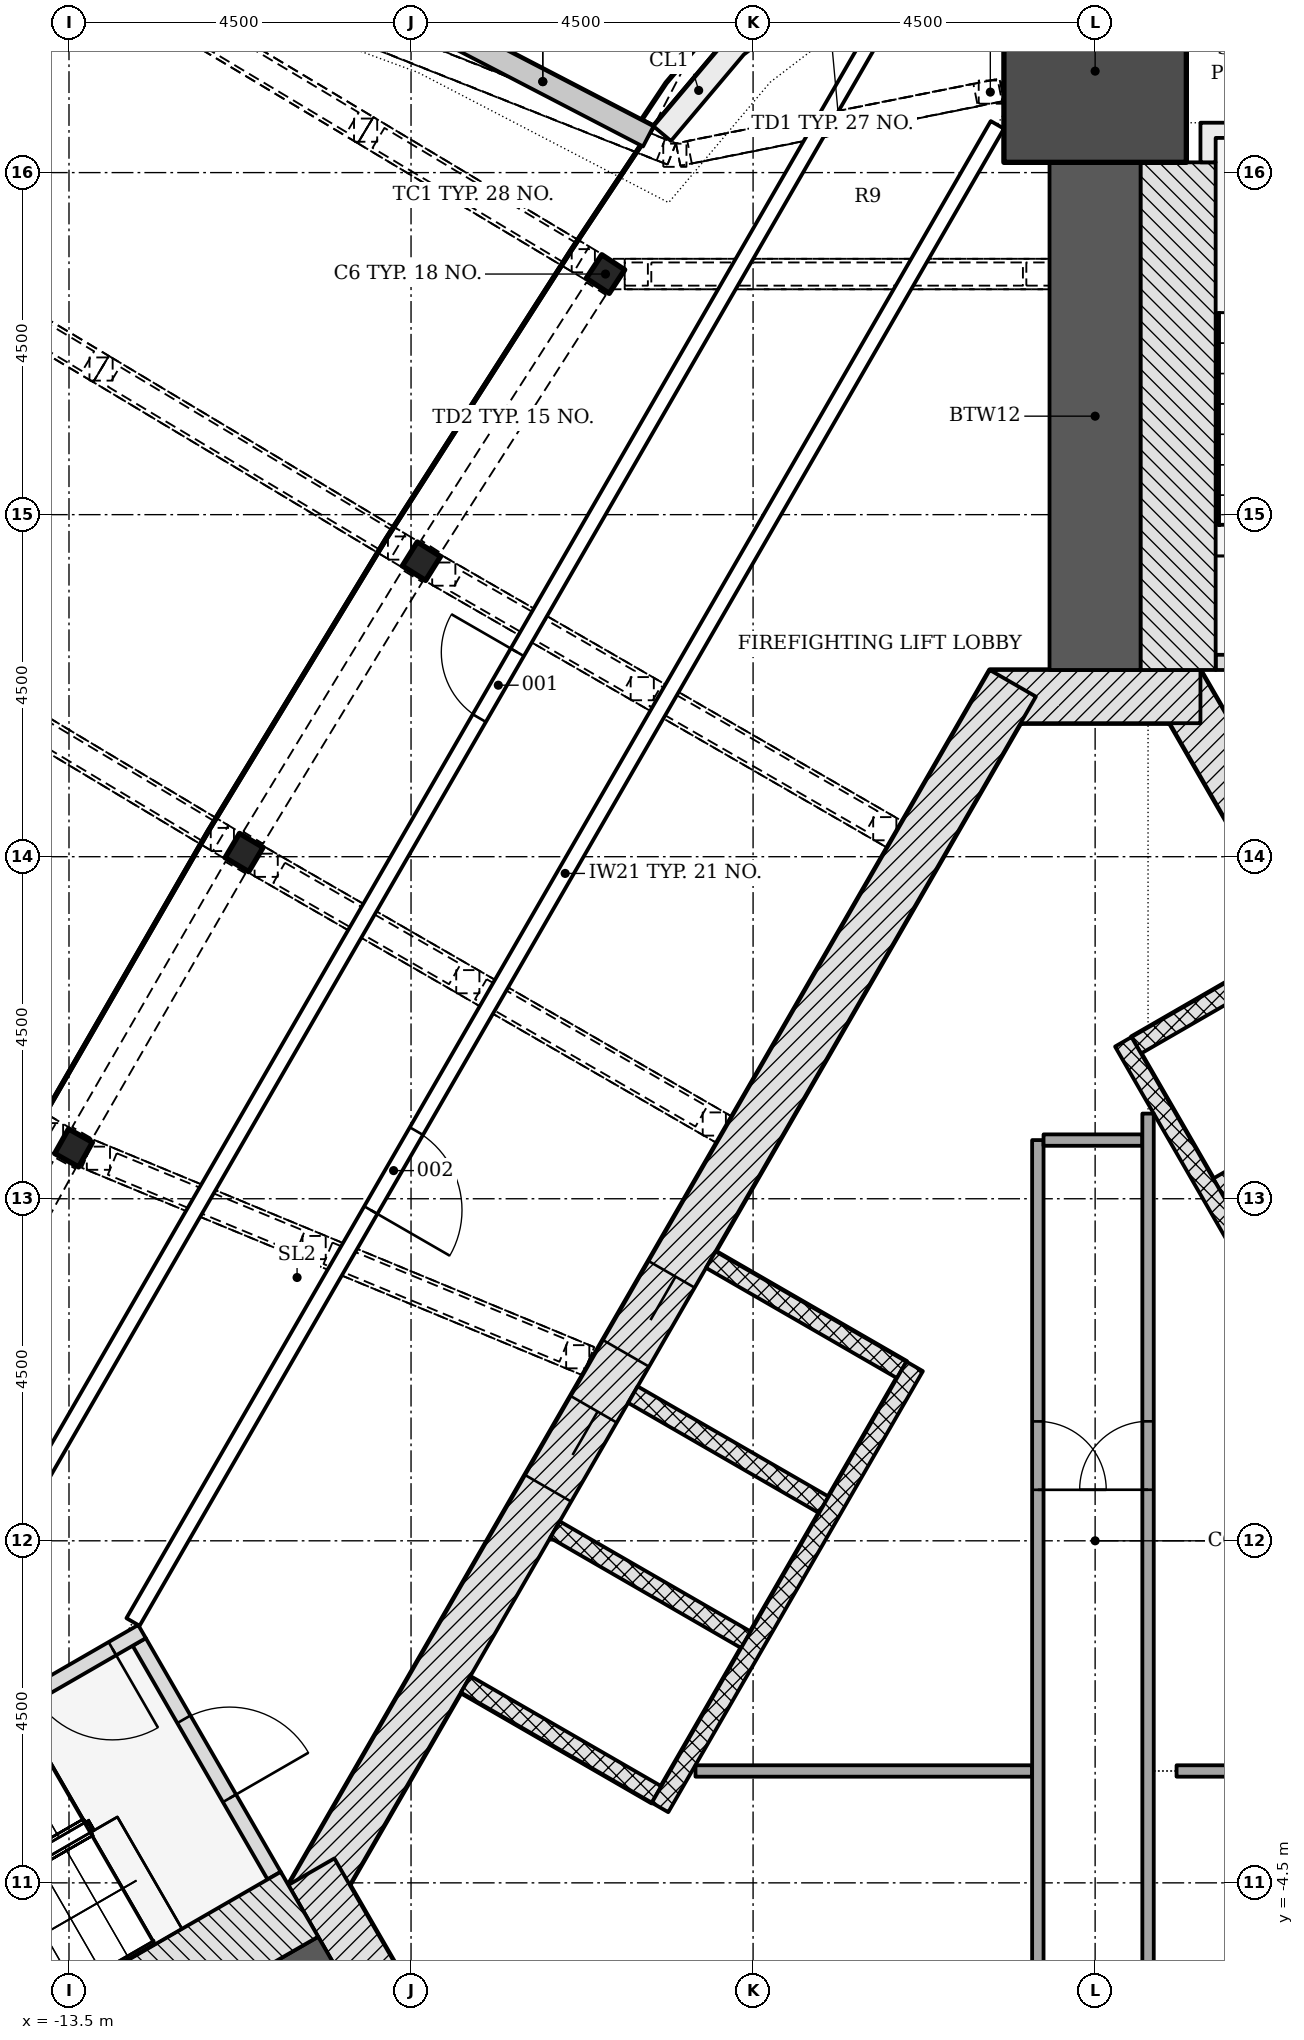
"""IFC4 building model, lengths in metres.
Left out: names, types, materials, properties, quantities, classifications, styles, units other than length and angle.
Written with IfcOpenShell. Run it as: python <this file> out.ifc"""

import sys

from ifc_helpers import new_model, si_unit, direction, frame, frame_2d, origin, origin_2d, place, context, subcontext, project, spatial, polyline, rectangle, i_section, outline, extrude, element, fill, save


model = new_model("IFC4")
c1 = context("Model", 3, precision=1e-05, world=origin(), true_north=direction((0.0, 1.0)))
c2 = subcontext(c1, "Body", "Model", "MODEL_VIEW")
j1 = project(units=[si_unit("LENGTHUNIT", "METRE"), si_unit("PLANEANGLEUNIT", "RADIAN")], contexts=[c1])
p1 = place(None, origin())
s1 = spatial("IfcSite", under=j1, at=p1, CompositionType="ELEMENT")
p2 = place(p1, origin())
s2 = spatial("IfcBuilding", under=s1, at=p2, CompositionType="ELEMENT")
p3 = place(p2, frame((0.0, 0.0, 258.0)))
s3 = spatial("IfcBuildingStorey", under=s2, at=p3, CompositionType="ELEMENT", Elevation=258.0)
p4 = place(p3, frame((10.311, -4.703, -0.3), z_axis=(0.0, 0.0, 1.0), x_axis=(-0.500001446645, 0.866024568562, 0.0)))
e1 = element("IfcWall", 1, at=p4, inside=s3, PredefinedType="SHEAR", context=c2, shape_type="SweptSolid", body=[
    extrude(rectangle(XDim=18.458, YDim=0.7, at=frame_2d((9.229, 0.0))), origin(), (0.0, 0.0, 1.0), 5.5),
])
p5 = place(p3, frame((1.386, 11.106, -0.3), z_axis=(0.0, 0.0, 1.0), x_axis=(-1.0, 0.0, 0.0)))
e2 = element("IfcWall", 2, at=p5, inside=s3, PredefinedType="SHEAR", context=c2, shape_type="SweptSolid", body=[
    extrude(rectangle(XDim=2.771, YDim=0.7, at=frame_2d((1.386, 0.0))), origin(), (0.0, 0.0, 1.0), 5.5),
])
p6 = place(p3, frame((-1.083, 11.281, -0.3), z_axis=(0.0, 0.0, 1.0), x_axis=(-0.500001446645, -0.866024568562, 0.0)))
e3 = element("IfcWall", 3, at=p6, inside=s3, PredefinedType="SHEAR", context=c2, shape_type="SweptSolid", body=[
    extrude(rectangle(XDim=18.458, YDim=0.7, at=frame_2d((9.229, 0.0))), origin(), (0.0, 0.0, 1.0), 5.5),
])
p7 = place(p6, frame((8.979, 0.0, 0.3)))
e4 = element("IfcOpeningElement", 4, at=p7, cuts=e3, PredefinedType="OPENING", context=c2, shape_type="SweptSolid", body=[
    extrude(rectangle(XDim=1.2, YDim=2.1, at=frame_2d((0.6, 1.05))), frame((0.0, 0.36, 0.0), z_axis=(0.0, -1.0, 0.0), x_axis=(1.0, 0.0, 0.0)), (0.0, 0.0, 1.0), 0.72),
])
p8 = place(p6, frame((11.029, 0.0, 0.3)))
e5 = element("IfcOpeningElement", 5, at=p8, cuts=e3, PredefinedType="OPENING", context=c2, shape_type="SweptSolid", body=[
    extrude(rectangle(XDim=1.2, YDim=2.1, at=frame_2d((0.6, 1.05))), frame((0.0, 0.36, 0.0), z_axis=(0.0, -1.0, 0.0), x_axis=(1.0, 0.0, 0.0)), (0.0, 0.0, 1.0), 0.72),
])
p9 = place(p3, frame((-10.311, -4.353, -0.3), z_axis=(0.0, 0.0, 1.0), x_axis=(0.500042739161, -0.866000726912, 0.0)))
e6 = element("IfcWall", 6, at=p9, inside=s3, PredefinedType="SHEAR", context=c2, shape_type="SweptSolid", body=[
    extrude(rectangle(XDim=2.771, YDim=0.7, at=frame_2d((1.386, 0.0))), origin(), (0.0, 0.0, 1.0), 5.5),
])
p10 = place(p3, frame((0.0, 11.456, -0.3), z_axis=(0.0, 0.0, 1.0), x_axis=(0.0, 1.0, 0.0)))
e7 = element("IfcWall", 7, at=p10, inside=s3, PredefinedType="SHEAR", context=c2, shape_type="SweptSolid", body=[
    extrude(rectangle(XDim=6.679, YDim=1.2, at=frame_2d((3.339, 0.0))), origin(), (0.0, 0.0, 1.0), 5.5),
])
p11 = place(p3, frame((-9.922, -5.728, -0.3), z_axis=(0.0, 0.0, 1.0), x_axis=(-0.866032176823, -0.499988268569, 0.0)))
e8 = element("IfcWall", 8, at=p11, inside=s3, PredefinedType="SHEAR", context=c2, shape_type="SweptSolid", body=[
    extrude(rectangle(XDim=6.678, YDim=1.2, at=frame_2d((3.339, 0.0))), origin(), (0.0, 0.0, 1.0), 5.5),
])
p12 = place(p3, frame((0.0, 19.335, -0.3), z_axis=(0.0, 0.0, 1.0), x_axis=(0.0, 1.0, 0.0)))
e9 = element("IfcColumn", 9, at=p12, inside=s3, PredefinedType="COLUMN", context=c2, shape_type="SweptSolid", body=[
    extrude(rectangle(XDim=2.4, YDim=2.4, at=origin_2d()), origin(), (0.0, 0.0, 1.0), 5.5),
])
for number, where, z_axis, x_axis in (
    (10, (-6.442, 16.666, -0.3), (0.0, 0.0, 1.0), (-0.549, -0.836, 0.0)),
    (11, (-8.863, 12.888, -0.3), (0.0, 0.0, 1.0), (-0.53, -0.848, 0.0)),
    (12, (-11.196, 9.055, -0.3), (0.0, 0.0, 1.0), (-0.51, -0.86, 0.0)),
    (13, (-13.44, 5.169, -0.3), (0.0, 0.0, 1.0), (-0.49, -0.872, 0.0)),
):
    element("IfcColumn", number, at=place(p3, frame(where, z_axis=z_axis, x_axis=x_axis)), inside=s3, PredefinedType="COLUMN", context=c2, shape_type="SweptSolid", body=[
        extrude(i_section(OverallWidth=0.371, OverallDepth=0.361, WebThickness=0.012, FlangeThickness=0.02, FilletRadius=0.015, at=origin_2d()), origin(), (0.0, 0.0, 1.0), 5.5),
    ])
p13 = place(p3, origin())
e14 = element("IfcWall", 14, at=p13, inside=s3, PredefinedType="NOTDEFINED", context=c2, shape_type="SweptSolid", body=[
    extrude(outline(polyline([(-5.81, 18.61), (-8.585, 20.051), (-8.724, 19.784), (-5.948, 18.343), (-5.81, 18.61)])), origin(), (0.0, 0.0, 1.0), 1.2),
])
p14 = place(p3, origin())
e15 = element("IfcWall", 15, at=p14, inside=s3, PredefinedType="NOTDEFINED", context=c2, shape_type="SweptSolid", body=[
    extrude(outline(polyline([(-18.145, -2.507), (-19.021, -4.273), (-19.538, -5.703), (-19.733, -7.21), (-19.599, -8.724), (-19.141, -10.174), (-18.381, -11.49), (-17.355, -12.611), (-16.111, -13.485), (-14.708, -14.069), (-13.211, -14.336), (-11.244, -14.46), (-11.225, -14.161), (-13.176, -14.038), (-14.623, -13.779), (-15.965, -13.22), (-17.156, -12.385), (-18.138, -11.312), (-18.865, -10.052), (-19.303, -8.665), (-19.432, -7.216), (-19.244, -5.774), (-18.745, -4.391), (-17.876, -2.64), (-18.145, -2.507)])), origin(), (0.0, 0.0, 1.0), 5.2),
])
p15 = place(p3, origin())
e16 = element("IfcWall", 16, at=p15, inside=s3, PredefinedType="NOTDEFINED", context=c2, shape_type="SweptSolid", body=[
    extrude(outline(polyline([(6.901, 16.968), (5.81, 18.61), (4.83, 19.771), (3.623, 20.695), (2.244, 21.335), (0.76, 21.664), (-0.76, 21.664), (-2.244, 21.335), (-3.623, 20.695), (-4.83, 19.771), (-5.81, 18.61), (-5.58, 18.416), (-4.622, 19.553), (-3.466, 20.437), (-2.147, 21.05), (-0.727, 21.364), (0.727, 21.364), (2.147, 21.05), (3.466, 20.437), (4.622, 19.553), (5.569, 18.429), (6.651, 16.802), (6.901, 16.968)])), origin(), (0.0, 0.0, 1.0), 5.2),
])
for number, where, z_axis, x_axis in (
    (17, (3.781, 5.907, -0.3), (0.0, 0.0, 1.0), (-0.866, -0.5, 0.0)),
    (18, (2.706, 7.769, -0.3), (0.0, 0.0, 1.0), (-0.866, -0.5, 0.0)),
):
    element("IfcWall", number, at=place(p3, frame(where, z_axis=z_axis, x_axis=x_axis)), inside=s3, PredefinedType="PARTITIONING", context=c2, shape_type="SweptSolid", body=[
        extrude(rectangle(XDim=2.5, YDim=0.25, at=frame_2d((1.25, 0.0))), origin(), (0.0, 0.0, 1.0), 5.5),
    ])
p16 = place(p3, frame((5.87, -2.961, 0.0), z_axis=(0.0, 0.0, 1.0), x_axis=(-0.50000615651, 0.866021849293, 0.0)))
e19 = element("IfcWall", 19, at=p16, inside=s3, PredefinedType="PARTITIONING", context=c2, shape_type="SweptSolid", body=[
    extrude(rectangle(XDim=11.0, YDim=0.25, at=frame_2d((5.5, 0.0))), origin(), (0.0, 0.0, 1.0), 5.2),
])
for number, where, z_axis, x_axis in (
    (20, (-5.056, 3.699, -0.3), (0.0, 0.0, 1.0), (0.866, -0.5, 0.0)),
    (21, (-6.081, 1.923, -0.3), (0.0, 0.0, 1.0), (0.866, -0.5, 0.0)),
    (22, (-7.106, 0.148, -0.3), (0.0, 0.0, 1.0), (0.866, -0.5, 0.0)),
    (23, (-8.281, -1.887, -0.3), (0.0, 0.0, 1.0), (0.866, -0.5, 0.0)),
):
    element("IfcWall", number, at=place(p3, frame(where, z_axis=z_axis, x_axis=x_axis)), inside=s3, PredefinedType="PARTITIONING", context=c2, shape_type="SweptSolid", body=[
        extrude(rectangle(XDim=2.9, YDim=0.25, at=frame_2d((1.45, 0.0))), origin(), (0.0, 0.0, 1.0), 5.5),
    ])
p17 = place(p3, frame((-2.374, 2.294, 0.0), z_axis=(0.0, 0.0, 1.0), x_axis=(-0.500003174267, -0.866023571113, 0.0)))
e24 = element("IfcWall", 24, at=p17, inside=s3, PredefinedType="PARTITIONING", context=c2, shape_type="SweptSolid", body=[
    extrude(rectangle(XDim=6.7, YDim=0.25, at=frame_2d((3.35, 0.0))), origin(), (0.0, 0.0, 1.0), 5.2),
])
p18 = place(p3, frame((-5.258, -3.028, 0.0), z_axis=(0.0, 0.0, 1.0), x_axis=(1.0, 0.0, 0.0)))
e25 = element("IfcWall", 25, at=p18, inside=s3, PredefinedType="PARTITIONING", context=c2, shape_type="SweptSolid", body=[
    extrude(rectangle(XDim=4.429, YDim=0.15, at=frame_2d((2.215, 0.0))), origin(), (0.0, 0.0, 1.0), 5.2),
])
p19 = place(p3, frame((-0.754, 5.272, 0.0), z_axis=(0.0, 0.0, 1.0), x_axis=(0.0, -1.0, 0.0)))
e26 = element("IfcWall", 26, at=p19, inside=s3, PredefinedType="PARTITIONING", context=c2, shape_type="SweptSolid", body=[
    extrude(rectangle(XDim=11.5, YDim=0.15, at=frame_2d((5.75, 0.0))), origin(), (0.0, 0.0, 1.0), 5.2),
])
p20 = place(p19, frame((3.701, 0.0, 0.0)))
e27 = element("IfcOpeningElement", 27, at=p20, cuts=e26, PredefinedType="OPENING", context=c2, shape_type="SweptSolid", body=[
    extrude(rectangle(XDim=0.9, YDim=2.1, at=frame_2d((0.45, 1.05))), frame((0.0, 0.085, 0.0), z_axis=(0.0, -1.0, 0.0), x_axis=(1.0, 0.0, 0.0)), (0.0, 0.0, 1.0), 0.17),
])
p21 = place(p3, frame((-0.679, 5.272, 0.0), z_axis=(0.0, 0.0, 1.0), x_axis=(1.0, 0.0, 0.0)))
e28 = element("IfcWall", 28, at=p21, inside=s3, PredefinedType="PARTITIONING", context=c2, shape_type="SweptSolid", body=[
    extrude(rectangle(XDim=1.3, YDim=0.15, at=frame_2d((0.65, 0.0))), origin(), (0.0, 0.0, 1.0), 5.2),
])
p22 = place(p3, frame((0.696, -5.928, 0.0), z_axis=(0.0, 0.0, 1.0), x_axis=(0.0, 1.0, 0.0)))
e29 = element("IfcWall", 29, at=p22, inside=s3, PredefinedType="PARTITIONING", context=c2, shape_type="SweptSolid", body=[
    extrude(rectangle(XDim=11.549, YDim=0.15, at=frame_2d((5.774, 0.0))), origin(), (0.0, 0.0, 1.0), 5.2),
])
p23 = place(p22, frame((6.6, 0.0, 0.0)))
e30 = element("IfcOpeningElement", 30, at=p23, cuts=e29, PredefinedType="OPENING", context=c2, shape_type="SweptSolid", body=[
    extrude(rectangle(XDim=0.9, YDim=2.1, at=frame_2d((0.45, 1.05))), frame((0.0, 0.085, 0.0), z_axis=(0.0, -1.0, 0.0), x_axis=(1.0, 0.0, 0.0)), (0.0, 0.0, 1.0), 0.17),
])
p24 = place(p3, frame((1.071, -3.028, 0.0), z_axis=(0.0, 0.0, 1.0), x_axis=(1.0, 0.0, 0.0)))
e31 = element("IfcWall", 31, at=p24, inside=s3, PredefinedType="PARTITIONING", context=c2, shape_type="SweptSolid", body=[
    extrude(rectangle(XDim=7.569, YDim=0.15, at=frame_2d((3.784, 0.0))), origin(), (0.0, 0.0, 1.0), 5.2),
])
p25 = place(p3, frame((5.135, 11.556, -0.3), z_axis=(0.0, 0.0, 1.0), x_axis=(-1.0, 0.0, 0.0)))
e32 = element("IfcWall", 32, at=p25, inside=s3, PredefinedType="SHEAR", context=c2, shape_type="SweptSolid", body=[
    extrude(rectangle(XDim=3.55, YDim=0.2, at=frame_2d((1.775, 0.0))), origin(), (0.0, 0.0, 1.0), 5.5),
])
p26 = place(p25, frame((1.175, 0.0, 0.3)))
e33 = element("IfcOpeningElement", 33, at=p26, cuts=e32, PredefinedType="OPENING", context=c2, shape_type="SweptSolid", body=[
    extrude(rectangle(XDim=1.2, YDim=2.1, at=frame_2d((0.6, 1.05))), frame((0.0, 0.11, 0.0), z_axis=(0.0, -1.0, 0.0), x_axis=(1.0, 0.0, 0.0)), (0.0, 0.0, 1.0), 0.22),
])
p27 = place(p3, frame((1.093, 11.456, -0.3), z_axis=(0.0, 0.0, 1.0), x_axis=(0.0, 1.0, 0.0)))
e34 = element("IfcWall", 34, at=p27, inside=s3, PredefinedType="SHEAR", context=c2, shape_type="SweptSolid", body=[
    extrude(rectangle(XDim=6.679, YDim=0.986, at=frame_2d((3.339, 0.0))), origin(), (0.0, 0.0, 1.0), 5.5),
])
p28 = place(p3, frame((0.0, 0.0, -0.3)))
e35 = element("IfcWall", 35, at=p28, inside=s3, PredefinedType="SHEAR", context=c2, shape_type="SweptSolid", body=[
    extrude(outline(polyline([(5.336, 17.056), (3.736, 18.656), (1.385, 18.656), (1.385, 18.135), (1.586, 18.135), (1.586, 18.456), (3.653, 18.456), (5.135, 16.974), (5.135, 17.056), (5.135, 17.056), (5.135, 17.056), (5.135, 17.056), (5.135, 17.056), (5.135, 17.056), (5.135, 17.056), (5.135, 17.056), (5.135, 17.056), (5.135, 17.056), (5.135, 17.056), (5.135, 17.056), (5.135, 17.056), (5.135, 17.056), (5.135, 17.056), (5.135, 17.056), (5.135, 17.056), (5.336, 17.056)])), origin(), (0.0, 0.0, 1.0), 5.5),
])
p29 = place(p3, frame((-12.576, -1.331, -0.3), z_axis=(0.0, 0.0, 1.0), x_axis=(0.499970499736, -0.8660424351, 0.0)))
e36 = element("IfcWall", 36, at=p29, inside=s3, PredefinedType="SHEAR", context=c2, shape_type="SweptSolid", body=[
    extrude(rectangle(XDim=3.55, YDim=0.2, at=frame_2d((1.775, 0.0))), origin(), (0.0, 0.0, 1.0), 5.5),
])
p30 = place(p29, frame((1.175, 0.0, 0.3)))
e37 = element("IfcOpeningElement", 37, at=p30, cuts=e36, PredefinedType="OPENING", context=c2, shape_type="SweptSolid", body=[
    extrude(rectangle(XDim=1.2, YDim=2.1, at=frame_2d((0.6, 1.05))), frame((0.0, 0.11, 0.0), z_axis=(0.0, -1.0, 0.0), x_axis=(1.0, 0.0, 0.0)), (0.0, 0.0, 1.0), 0.22),
])
p31 = place(p3, frame((-12.539, -1.194, -0.3), z_axis=(0.0, 0.0, 1.0), x_axis=(-0.866045472092, -0.499965239061, 0.0)))
e38 = element("IfcWall", 38, at=p31, inside=s3, PredefinedType="SHEAR", context=c2, shape_type="SweptSolid", body=[
    extrude(rectangle(XDim=5.6, YDim=0.2, at=frame_2d((2.8, 0.0))), origin(), (0.0, 0.0, 1.0), 5.5),
])
p32 = place(p31, frame((0.45, 0.0, 0.3)))
e39 = element("IfcOpeningElement", 39, at=p32, cuts=e38, PredefinedType="OPENING", context=c2, shape_type="SweptSolid", body=[
    extrude(rectangle(XDim=1.2, YDim=2.1, at=frame_2d((0.6, 1.05))), frame((0.0, 0.11, 0.0), z_axis=(0.0, -1.0, 0.0), x_axis=(1.0, 0.0, 0.0)), (0.0, 0.0, 1.0), 0.22),
])
p33 = place(p3, frame((-10.468, -4.782, -0.3), z_axis=(0.0, 0.0, 1.0), x_axis=(-0.866016347338, -0.500015685897, 0.0)))
e40 = element("IfcWall", 40, at=p33, inside=s3, PredefinedType="SHEAR", context=c2, shape_type="SweptSolid", body=[
    extrude(rectangle(XDim=6.678, YDim=0.986, at=frame_2d((3.339, 0.0))), origin(), (0.0, 0.0, 1.0), 5.5),
])
p34 = place(p3, frame((-1.287, 18.628, 0.0), z_axis=(0.0, 0.0, 1.0), x_axis=(-0.499998747105, -0.866026127143, 0.0)))
e41 = element("IfcWall", 41, at=p34, inside=s3, PredefinedType="PARTITIONING", context=c2, shape_type="SweptSolid", body=[
    extrude(rectangle(XDim=22.743, YDim=0.2, at=frame_2d((11.371, 0.0))), origin(), (0.0, 0.0, 1.0), 4.652),
])
p35 = place(p34, frame((15.286, 0.0, 0.0)))
e42 = element("IfcOpeningElement", 42, at=p35, cuts=e41, PredefinedType="OPENING", context=c2, shape_type="SweptSolid", body=[
    extrude(rectangle(XDim=1.2, YDim=2.1, at=frame_2d((0.6, 1.05))), frame((0.0, 0.11, 0.0), z_axis=(0.0, -1.0, 0.0), x_axis=(1.0, 0.0, 0.0)), (0.0, 0.0, 1.0), 0.22),
])
p36 = place(p3, frame((-16.104, -3.037, 0.0), z_axis=(0.0, 0.0, 1.0), x_axis=(0.500001441734, 0.866024571397, 0.0)))
e43 = element("IfcWall", 43, at=p36, inside=s3, PredefinedType="PARTITIONING", context=c2, shape_type="SweptSolid", body=[
    extrude(rectangle(XDim=26.765, YDim=0.2, at=frame_2d((13.383, 0.0))), origin(), (0.0, 0.0, 1.0), 4.652),
])
p37 = place(p36, frame((16.004, 0.0, 0.0)))
e44 = element("IfcOpeningElement", 44, at=p37, cuts=e43, PredefinedType="OPENING", context=c2, shape_type="SweptSolid", body=[
    extrude(rectangle(XDim=1.0, YDim=2.1, at=frame_2d((0.5, 1.05))), frame((0.0, 0.11, 0.0), z_axis=(0.0, -1.0, 0.0), x_axis=(1.0, 0.0, 0.0)), (0.0, 0.0, 1.0), 0.22),
])
p38 = place(p7, origin())
e45 = element("IfcDoor", 45, at=p38, inside=s3, OperationType="DOUBLE_DOOR_SLIDING", PredefinedType="DOOR", context=c2, shape_type="SweptSolid", body=[
    extrude(rectangle(XDim=1.2, YDim=2.1, at=frame_2d((0.6, 1.05))), frame((0.0, 0.025, 0.0), z_axis=(0.0, -1.0, 0.0), x_axis=(1.0, 0.0, 0.0)), (0.0, 0.0, 1.0), 0.05),
])
fill(e4, e45)
p39 = place(p8, origin())
e46 = element("IfcDoor", 46, at=p39, inside=s3, OperationType="DOUBLE_DOOR_SLIDING", PredefinedType="DOOR", context=c2, shape_type="SweptSolid", body=[
    extrude(rectangle(XDim=1.2, YDim=2.1, at=frame_2d((0.6, 1.05))), frame((0.0, 0.025, 0.0), z_axis=(0.0, -1.0, 0.0), x_axis=(1.0, 0.0, 0.0)), (0.0, 0.0, 1.0), 0.05),
])
fill(e5, e46)
p40 = place(p20, origin())
e47 = element("IfcDoor", 47, at=p40, inside=s3, OperationType="SINGLE_SWING_RIGHT", PredefinedType="DOOR", context=c2, shape_type="SweptSolid", body=[
    extrude(rectangle(XDim=0.9, YDim=2.1, at=frame_2d((0.45, 1.05))), frame((0.0, 0.025, 0.0), z_axis=(0.0, -1.0, 0.0), x_axis=(1.0, 0.0, 0.0)), (0.0, 0.0, 1.0), 0.05),
])
fill(e27, e47)
p41 = place(p23, origin())
e48 = element("IfcDoor", 48, at=p41, inside=s3, OperationType="SINGLE_SWING_LEFT", PredefinedType="DOOR", context=c2, shape_type="SweptSolid", body=[
    extrude(rectangle(XDim=0.9, YDim=2.1, at=frame_2d((0.45, 1.05))), frame((0.0, 0.025, 0.0), z_axis=(0.0, -1.0, 0.0), x_axis=(1.0, 0.0, 0.0)), (0.0, 0.0, 1.0), 0.05),
])
fill(e30, e48)
p42 = place(p30, origin())
e49 = element("IfcDoor", 49, at=p42, inside=s3, OperationType="SINGLE_SWING_RIGHT", PredefinedType="DOOR", context=c2, shape_type="SweptSolid", body=[
    extrude(rectangle(XDim=1.2, YDim=2.1, at=frame_2d((0.6, 1.05))), frame((0.0, 0.025, 0.0), z_axis=(0.0, -1.0, 0.0), x_axis=(1.0, 0.0, 0.0)), (0.0, 0.0, 1.0), 0.05),
])
fill(e37, e49)
p43 = place(p32, origin())
e50 = element("IfcDoor", 50, at=p43, inside=s3, OperationType="SINGLE_SWING_LEFT", PredefinedType="DOOR", context=c2, shape_type="SweptSolid", body=[
    extrude(rectangle(XDim=1.2, YDim=2.1, at=frame_2d((0.6, 1.05))), frame((0.0, 0.025, 0.0), z_axis=(0.0, -1.0, 0.0), x_axis=(1.0, 0.0, 0.0)), (0.0, 0.0, 1.0), 0.05),
])
fill(e39, e50)
p44 = place(p37, origin())
e51 = element("IfcDoor", 51, at=p44, inside=s3, OperationType="SINGLE_SWING_RIGHT", PredefinedType="DOOR", context=c2, shape_type="SweptSolid", body=[
    extrude(rectangle(XDim=1.0, YDim=2.1, at=frame_2d((0.5, 1.05))), frame((0.0, 0.025, 0.0), z_axis=(0.0, -1.0, 0.0), x_axis=(1.0, 0.0, 0.0)), (0.0, 0.0, 1.0), 0.05),
])
fill(e44, e51)
p45 = place(p35, origin())
e52 = element("IfcDoor", 52, at=p45, inside=s3, OperationType="SINGLE_SWING_RIGHT", PredefinedType="DOOR", context=c2, shape_type="SweptSolid", body=[
    extrude(rectangle(XDim=1.2, YDim=2.1, at=frame_2d((0.6, 1.05))), frame((0.0, 0.025, 0.0), z_axis=(0.0, -1.0, 0.0), x_axis=(1.0, 0.0, 0.0)), (0.0, 0.0, 1.0), 0.05),
])
fill(e42, e52)
save(model, sys.argv[1])
